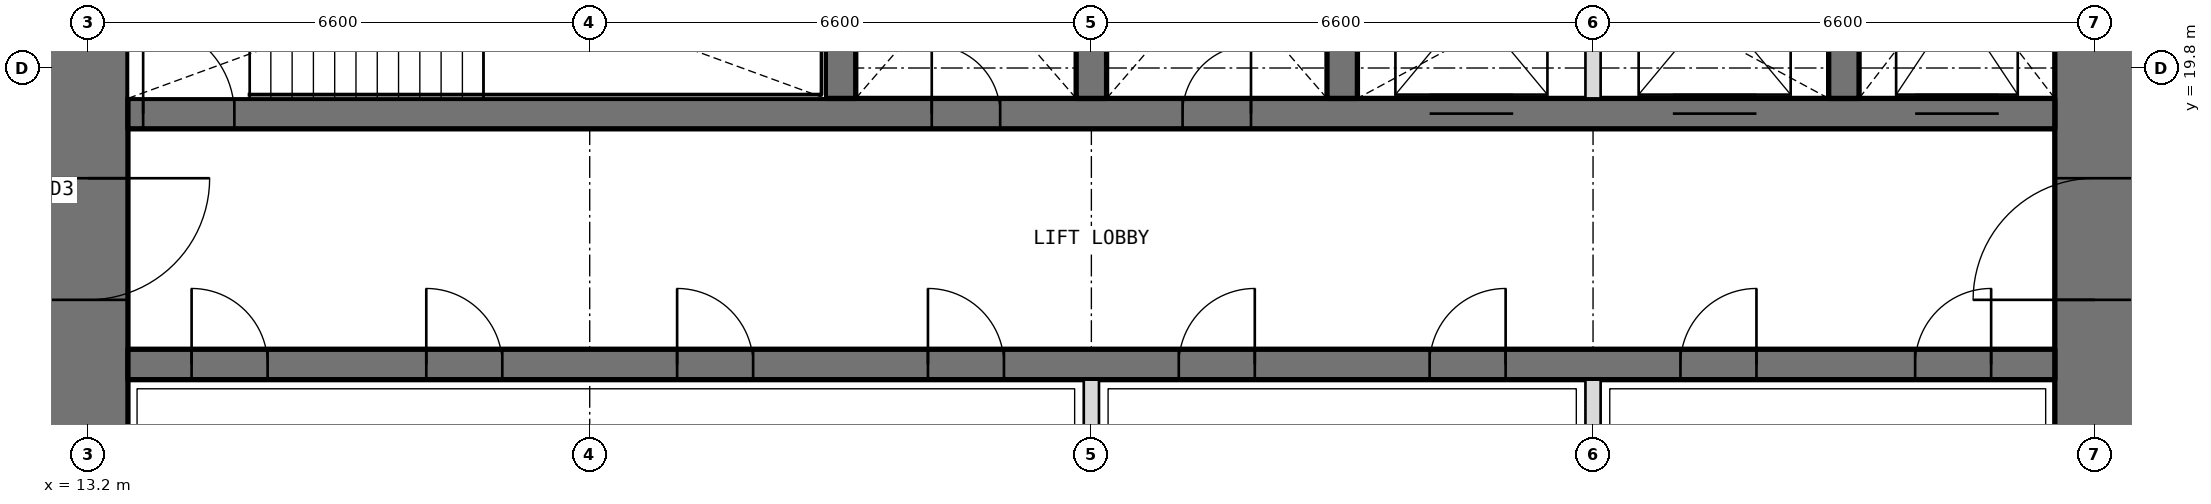
"""IFC4 building model, lengths in metres.
Left out: names, types, materials, properties, quantities, classifications, styles, units other than length and angle.
Written with IfcOpenShell. Run it as: python <this file> out.ifc"""

import sys

from ifc_helpers import new_model, si_unit, direction, frame, frame_2d, origin, place, context, subcontext, project, spatial, rectangle, extrude, element, fill, save


model = new_model("IFC4")
c1 = context("Model", 3, precision=1e-05, world=origin(), true_north=direction((0.0, 1.0)))
c2 = subcontext(c1, "Body", "Model", "MODEL_VIEW")
j1 = project(units=[si_unit("LENGTHUNIT", "METRE"), si_unit("PLANEANGLEUNIT", "RADIAN")], contexts=[c1])
p1 = place(None, origin())
s1 = spatial("IfcSite", under=j1, at=p1, CompositionType="ELEMENT")
p2 = place(p1, origin())
s2 = spatial("IfcBuilding", under=s1, at=p2, CompositionType="ELEMENT")
p3 = place(p2, frame((0.0, 0.0, 271.2)))
s3 = spatial("IfcBuildingStorey", under=s2, at=p3, CompositionType="ELEMENT", Elevation=271.2)
p4 = place(p3, frame((39.6, 13.725, 0.0), z_axis=(0.0, 0.0, 1.0), x_axis=(0.0, 1.0, 0.0)))
e1 = element("IfcWall", 1, at=p4, inside=s3, PredefinedType="SHEAR", context=c2, shape_type="SweptSolid", body=[
    extrude(rectangle(XDim=18.75, YDim=1.05, at=frame_2d((9.375, 0.0))), origin(), (0.0, 0.0, 1.0), 4.2),
])
p5 = place(p4, frame((3.025, 0.0, 0.0)))
e2 = element("IfcOpeningElement", 2, at=p5, cuts=e1, PredefinedType="OPENING", context=c2, shape_type="SweptSolid", body=[
    extrude(rectangle(XDim=1.6, YDim=2.1, at=frame_2d((0.8, 1.05))), frame((0.0, 0.535, 0.0), z_axis=(0.0, -1.0, 0.0), x_axis=(1.0, 0.0, 0.0)), (0.0, 0.0, 1.0), 1.07),
])
p6 = place(p4, frame((13.825, 0.0, 0.0)))
e3 = element("IfcOpeningElement", 3, at=p6, cuts=e1, PredefinedType="OPENING", context=c2, shape_type="SweptSolid", body=[
    extrude(rectangle(XDim=1.6, YDim=2.1, at=frame_2d((0.8, 1.05))), frame((0.0, 0.535, 0.0), z_axis=(0.0, -1.0, 0.0), x_axis=(1.0, 0.0, 0.0)), (0.0, 0.0, 1.0), 1.07),
])
p7 = place(p3, frame((13.2, 32.475, 0.0), z_axis=(0.0, 0.0, 1.0), x_axis=(0.0, -1.0, 0.0)))
e4 = element("IfcWall", 4, at=p7, inside=s3, PredefinedType="SHEAR", context=c2, shape_type="SweptSolid", body=[
    extrude(rectangle(XDim=18.75, YDim=1.05, at=frame_2d((9.375, 0.0))), origin(), (0.0, 0.0, 1.0), 4.2),
])
p8 = place(p7, frame((14.125, 0.0, 0.0)))
e5 = element("IfcOpeningElement", 5, at=p8, cuts=e4, PredefinedType="OPENING", context=c2, shape_type="SweptSolid", body=[
    extrude(rectangle(XDim=1.6, YDim=2.1, at=frame_2d((0.8, 1.05))), frame((0.0, 0.535, 0.0), z_axis=(0.0, -1.0, 0.0), x_axis=(1.0, 0.0, 0.0)), (0.0, 0.0, 1.0), 1.07),
])
p9 = place(p7, frame((3.325, 0.0, 0.0)))
e6 = element("IfcOpeningElement", 6, at=p9, cuts=e4, PredefinedType="OPENING", context=c2, shape_type="SweptSolid", body=[
    extrude(rectangle(XDim=1.6, YDim=2.1, at=frame_2d((0.8, 1.05))), frame((0.0, 0.535, 0.0), z_axis=(0.0, -1.0, 0.0), x_axis=(1.0, 0.0, 0.0)), (0.0, 0.0, 1.0), 1.07),
])
p10 = place(p3, frame((13.725, 15.9, 0.0), z_axis=(0.0, 0.0, 1.0), x_axis=(1.0, 0.0, 0.0)))
e7 = element("IfcWall", 7, at=p10, inside=s3, PredefinedType="SHEAR", context=c2, shape_type="SweptSolid", body=[
    extrude(rectangle(XDim=25.35, YDim=0.4, at=frame_2d((12.675, 0.0))), origin(), (0.0, 0.0, 1.0), 4.2),
])
p11 = place(p10, frame((0.837, 0.0, 0.0)))
e8 = element("IfcOpeningElement", 8, at=p11, cuts=e7, PredefinedType="OPENING", context=c2, shape_type="SweptSolid", body=[
    extrude(rectangle(XDim=1.0, YDim=2.1, at=frame_2d((0.5, 1.05))), frame((0.0, 0.21, 0.0), z_axis=(0.0, -1.0, 0.0), x_axis=(1.0, 0.0, 0.0)), (0.0, 0.0, 1.0), 0.42),
])
p12 = place(p10, frame((3.925, 0.0, 0.0)))
e9 = element("IfcOpeningElement", 9, at=p12, cuts=e7, PredefinedType="OPENING", context=c2, shape_type="SweptSolid", body=[
    extrude(rectangle(XDim=1.0, YDim=2.1, at=frame_2d((0.5, 1.05))), frame((0.0, 0.21, 0.0), z_axis=(0.0, -1.0, 0.0), x_axis=(1.0, 0.0, 0.0)), (0.0, 0.0, 1.0), 0.42),
])
p13 = place(p10, frame((7.225, 0.0, 0.0)))
e10 = element("IfcOpeningElement", 10, at=p13, cuts=e7, PredefinedType="OPENING", context=c2, shape_type="SweptSolid", body=[
    extrude(rectangle(XDim=1.0, YDim=2.1, at=frame_2d((0.5, 1.05))), frame((0.0, 0.21, 0.0), z_axis=(0.0, -1.0, 0.0), x_axis=(1.0, 0.0, 0.0)), (0.0, 0.0, 1.0), 0.42),
])
p14 = place(p10, frame((10.525, 0.0, 0.0)))
e11 = element("IfcOpeningElement", 11, at=p14, cuts=e7, PredefinedType="OPENING", context=c2, shape_type="SweptSolid", body=[
    extrude(rectangle(XDim=1.0, YDim=2.1, at=frame_2d((0.5, 1.05))), frame((0.0, 0.21, 0.0), z_axis=(0.0, -1.0, 0.0), x_axis=(1.0, 0.0, 0.0)), (0.0, 0.0, 1.0), 0.42),
])
p15 = place(p10, frame((13.825, 0.0, 0.0)))
e12 = element("IfcOpeningElement", 12, at=p15, cuts=e7, PredefinedType="OPENING", context=c2, shape_type="SweptSolid", body=[
    extrude(rectangle(XDim=1.0, YDim=2.1, at=frame_2d((0.5, 1.05))), frame((0.0, 0.21, 0.0), z_axis=(0.0, -1.0, 0.0), x_axis=(1.0, 0.0, 0.0)), (0.0, 0.0, 1.0), 0.42),
])
p16 = place(p10, frame((17.125, 0.0, 0.0)))
e13 = element("IfcOpeningElement", 13, at=p16, cuts=e7, PredefinedType="OPENING", context=c2, shape_type="SweptSolid", body=[
    extrude(rectangle(XDim=1.0, YDim=2.1, at=frame_2d((0.5, 1.05))), frame((0.0, 0.21, 0.0), z_axis=(0.0, -1.0, 0.0), x_axis=(1.0, 0.0, 0.0)), (0.0, 0.0, 1.0), 0.42),
])
p17 = place(p10, frame((20.425, 0.0, 0.0)))
e14 = element("IfcOpeningElement", 14, at=p17, cuts=e7, PredefinedType="OPENING", context=c2, shape_type="SweptSolid", body=[
    extrude(rectangle(XDim=1.0, YDim=2.1, at=frame_2d((0.5, 1.05))), frame((0.0, 0.21, 0.0), z_axis=(0.0, -1.0, 0.0), x_axis=(1.0, 0.0, 0.0)), (0.0, 0.0, 1.0), 0.42),
])
p18 = place(p10, frame((23.512, 0.0, 0.0)))
e15 = element("IfcOpeningElement", 15, at=p18, cuts=e7, PredefinedType="OPENING", context=c2, shape_type="SweptSolid", body=[
    extrude(rectangle(XDim=1.0, YDim=2.1, at=frame_2d((0.5, 1.05))), frame((0.0, 0.21, 0.0), z_axis=(0.0, -1.0, 0.0), x_axis=(1.0, 0.0, 0.0)), (0.0, 0.0, 1.0), 0.42),
])
p19 = place(p3, frame((13.725, 19.2, 0.0), z_axis=(0.0, 0.0, 1.0), x_axis=(1.0, 0.0, 0.0)))
e16 = element("IfcWall", 16, at=p19, inside=s3, PredefinedType="SHEAR", context=c2, shape_type="SweptSolid", body=[
    extrude(rectangle(XDim=25.35, YDim=0.4, at=frame_2d((12.675, 0.0))), origin(), (0.0, 0.0, 1.0), 4.2),
])
p20 = place(p19, frame((10.575, 0.0, 0.0)))
e17 = element("IfcOpeningElement", 17, at=p20, cuts=e16, PredefinedType="OPENING", context=c2, shape_type="SweptSolid", body=[
    extrude(rectangle(XDim=0.9, YDim=2.1, at=frame_2d((0.45, 1.05))), frame((0.0, 0.21, 0.0), z_axis=(0.0, -1.0, 0.0), x_axis=(1.0, 0.0, 0.0)), (0.0, 0.0, 1.0), 0.42),
])
p21 = place(p19, frame((13.875, 0.0, 0.0)))
e18 = element("IfcOpeningElement", 18, at=p21, cuts=e16, PredefinedType="OPENING", context=c2, shape_type="SweptSolid", body=[
    extrude(rectangle(XDim=0.9, YDim=2.1, at=frame_2d((0.45, 1.05))), frame((0.0, 0.21, 0.0), z_axis=(0.0, -1.0, 0.0), x_axis=(1.0, 0.0, 0.0)), (0.0, 0.0, 1.0), 0.42),
])
p22 = place(p19, frame((0.2, 0.0, 0.0)))
e19 = element("IfcOpeningElement", 19, at=p22, cuts=e16, PredefinedType="OPENING", context=c2, shape_type="SweptSolid", body=[
    extrude(rectangle(XDim=1.2, YDim=2.1, at=frame_2d((0.6, 1.05))), frame((0.0, 0.21, 0.0), z_axis=(0.0, -1.0, 0.0), x_axis=(1.0, 0.0, 0.0)), (0.0, 0.0, 1.0), 0.42),
])
p23 = place(p19, frame((23.512, 0.0, 0.0)))
e20 = element("IfcOpeningElement", 20, at=p23, cuts=e16, PredefinedType="OPENING", context=c2, shape_type="SweptSolid", body=[
    extrude(rectangle(XDim=1.1, YDim=2.1, at=frame_2d((0.55, 1.05))), frame((0.0, 0.21, 0.0), z_axis=(0.0, -1.0, 0.0), x_axis=(1.0, 0.0, 0.0)), (0.0, 0.0, 1.0), 0.42),
])
p24 = place(p19, frame((17.125, 0.0, 0.0)))
e21 = element("IfcOpeningElement", 21, at=p24, cuts=e16, PredefinedType="OPENING", context=c2, shape_type="SweptSolid", body=[
    extrude(rectangle(XDim=1.1, YDim=2.1, at=frame_2d((0.55, 1.05))), frame((0.0, 0.21, 0.0), z_axis=(0.0, -1.0, 0.0), x_axis=(1.0, 0.0, 0.0)), (0.0, 0.0, 1.0), 0.42),
])
p25 = place(p19, frame((20.325, 0.0, 0.0)))
e22 = element("IfcOpeningElement", 22, at=p25, cuts=e16, PredefinedType="OPENING", context=c2, shape_type="SweptSolid", body=[
    extrude(rectangle(XDim=1.1, YDim=2.1, at=frame_2d((0.55, 1.05))), frame((0.0, 0.21, 0.0), z_axis=(0.0, -1.0, 0.0), x_axis=(1.0, 0.0, 0.0)), (0.0, 0.0, 1.0), 0.42),
])
for number, where, z_axis, x_axis in (
    (23, (23.1, 19.4, 0.0), (0.0, 0.0, 1.0), (0.0, 1.0, 0.0)),
    (24, (26.4, 19.4, 0.0), (0.0, 0.0, 1.0), (0.0, 1.0, 0.0)),
    (25, (29.7, 19.4, 0.0), (0.0, 0.0, 1.0), (0.0, 1.0, 0.0)),
    (26, (36.3, 19.4, 0.0), (0.0, 0.0, 1.0), (0.0, 1.0, 0.0)),
):
    element("IfcWall", number, at=place(p3, frame(where, z_axis=z_axis, x_axis=x_axis)), inside=s3, PredefinedType="SHEAR", context=c2, shape_type="SweptSolid", body=[
        extrude(rectangle(XDim=3.35, YDim=0.4, at=frame_2d((1.675, 0.0))), origin(), (0.0, 0.0, 1.0), 4.2),
    ])
for number, where, z_axis, x_axis in (
    (27, (26.4, 13.725, 0.0), (0.0, 0.0, 1.0), (0.0, 1.0, 0.0)),
    (28, (33.0, 13.725, 0.0), (0.0, 0.0, 1.0), (0.0, 1.0, 0.0)),
):
    element("IfcWall", number, at=place(p3, frame(where, z_axis=z_axis, x_axis=x_axis)), inside=s3, PredefinedType="PARTITIONING", context=c2, shape_type="SweptSolid", body=[
        extrude(rectangle(XDim=1.975, YDim=0.2, at=frame_2d((0.987, 0.0))), origin(), (0.0, 0.0, 1.0), 4.2),
    ])
p26 = place(p3, frame((33.0, 19.4, 0.0), z_axis=(0.0, 0.0, 1.0), x_axis=(0.0, 1.0, 0.0)))
e29 = element("IfcWall", 29, at=p26, inside=s3, PredefinedType="PARTITIONING", context=c2, shape_type="SweptSolid", body=[
    extrude(rectangle(XDim=3.35, YDim=0.2, at=frame_2d((1.675, 0.0))), origin(), (0.0, 0.0, 1.0), 4.2),
])
p27 = place(p20, origin())
e30 = element("IfcDoor", 30, at=p27, inside=s3, OperationType="SINGLE_SWING_LEFT", PredefinedType="DOOR", context=c2, shape_type="SweptSolid", body=[
    extrude(rectangle(XDim=0.9, YDim=2.1, at=frame_2d((0.45, 1.05))), frame((0.0, 0.025, 0.0), z_axis=(0.0, -1.0, 0.0), x_axis=(1.0, 0.0, 0.0)), (0.0, 0.0, 1.0), 0.05),
])
fill(e17, e30)
p28 = place(p21, origin())
e31 = element("IfcDoor", 31, at=p28, inside=s3, OperationType="SINGLE_SWING_RIGHT", PredefinedType="DOOR", context=c2, shape_type="SweptSolid", body=[
    extrude(rectangle(XDim=0.9, YDim=2.1, at=frame_2d((0.45, 1.05))), frame((0.0, 0.025, 0.0), z_axis=(0.0, -1.0, 0.0), x_axis=(1.0, 0.0, 0.0)), (0.0, 0.0, 1.0), 0.05),
])
fill(e18, e31)
p29 = place(p11, origin())
e32 = element("IfcDoor", 32, at=p29, inside=s3, OperationType="SINGLE_SWING_LEFT", PredefinedType="DOOR", context=c2, shape_type="SweptSolid", body=[
    extrude(rectangle(XDim=1.0, YDim=2.1, at=frame_2d((0.5, 1.05))), frame((0.0, 0.025, 0.0), z_axis=(0.0, -1.0, 0.0), x_axis=(1.0, 0.0, 0.0)), (0.0, 0.0, 1.0), 0.05),
])
fill(e8, e32)
p30 = place(p12, origin())
e33 = element("IfcDoor", 33, at=p30, inside=s3, OperationType="SINGLE_SWING_LEFT", PredefinedType="DOOR", context=c2, shape_type="SweptSolid", body=[
    extrude(rectangle(XDim=1.0, YDim=2.1, at=frame_2d((0.5, 1.05))), frame((0.0, 0.025, 0.0), z_axis=(0.0, -1.0, 0.0), x_axis=(1.0, 0.0, 0.0)), (0.0, 0.0, 1.0), 0.05),
])
fill(e9, e33)
p31 = place(p13, origin())
e34 = element("IfcDoor", 34, at=p31, inside=s3, OperationType="SINGLE_SWING_LEFT", PredefinedType="DOOR", context=c2, shape_type="SweptSolid", body=[
    extrude(rectangle(XDim=1.0, YDim=2.1, at=frame_2d((0.5, 1.05))), frame((0.0, 0.025, 0.0), z_axis=(0.0, -1.0, 0.0), x_axis=(1.0, 0.0, 0.0)), (0.0, 0.0, 1.0), 0.05),
])
fill(e10, e34)
p32 = place(p14, origin())
e35 = element("IfcDoor", 35, at=p32, inside=s3, OperationType="SINGLE_SWING_LEFT", PredefinedType="DOOR", context=c2, shape_type="SweptSolid", body=[
    extrude(rectangle(XDim=1.0, YDim=2.1, at=frame_2d((0.5, 1.05))), frame((0.0, 0.025, 0.0), z_axis=(0.0, -1.0, 0.0), x_axis=(1.0, 0.0, 0.0)), (0.0, 0.0, 1.0), 0.05),
])
fill(e11, e35)
p33 = place(p15, origin())
e36 = element("IfcDoor", 36, at=p33, inside=s3, OperationType="SINGLE_SWING_RIGHT", PredefinedType="DOOR", context=c2, shape_type="SweptSolid", body=[
    extrude(rectangle(XDim=1.0, YDim=2.1, at=frame_2d((0.5, 1.05))), frame((0.0, 0.025, 0.0), z_axis=(0.0, -1.0, 0.0), x_axis=(1.0, 0.0, 0.0)), (0.0, 0.0, 1.0), 0.05),
])
fill(e12, e36)
p34 = place(p16, origin())
e37 = element("IfcDoor", 37, at=p34, inside=s3, OperationType="SINGLE_SWING_RIGHT", PredefinedType="DOOR", context=c2, shape_type="SweptSolid", body=[
    extrude(rectangle(XDim=1.0, YDim=2.1, at=frame_2d((0.5, 1.05))), frame((0.0, 0.025, 0.0), z_axis=(0.0, -1.0, 0.0), x_axis=(1.0, 0.0, 0.0)), (0.0, 0.0, 1.0), 0.05),
])
fill(e13, e37)
p35 = place(p17, origin())
e38 = element("IfcDoor", 38, at=p35, inside=s3, OperationType="SINGLE_SWING_RIGHT", PredefinedType="DOOR", context=c2, shape_type="SweptSolid", body=[
    extrude(rectangle(XDim=1.0, YDim=2.1, at=frame_2d((0.5, 1.05))), frame((0.0, 0.025, 0.0), z_axis=(0.0, -1.0, 0.0), x_axis=(1.0, 0.0, 0.0)), (0.0, 0.0, 1.0), 0.05),
])
fill(e14, e38)
p36 = place(p18, origin())
e39 = element("IfcDoor", 39, at=p36, inside=s3, OperationType="SINGLE_SWING_RIGHT", PredefinedType="DOOR", context=c2, shape_type="SweptSolid", body=[
    extrude(rectangle(XDim=1.0, YDim=2.1, at=frame_2d((0.5, 1.05))), frame((0.0, 0.025, 0.0), z_axis=(0.0, -1.0, 0.0), x_axis=(1.0, 0.0, 0.0)), (0.0, 0.0, 1.0), 0.05),
])
fill(e15, e39)
p37 = place(p22, origin())
e40 = element("IfcDoor", 40, at=p37, inside=s3, OperationType="SINGLE_SWING_LEFT", PredefinedType="DOOR", context=c2, shape_type="SweptSolid", body=[
    extrude(rectangle(XDim=1.2, YDim=2.1, at=frame_2d((0.6, 1.05))), frame((0.0, 0.025, 0.0), z_axis=(0.0, -1.0, 0.0), x_axis=(1.0, 0.0, 0.0)), (0.0, 0.0, 1.0), 0.05),
])
fill(e19, e40)
p38 = place(p8, origin())
e41 = element("IfcDoor", 41, at=p38, inside=s3, OperationType="DOUBLE_DOOR_DOUBLE_SWING", PredefinedType="DOOR", context=c2, shape_type="SweptSolid", body=[
    extrude(rectangle(XDim=1.6, YDim=2.1, at=frame_2d((0.8, 1.05))), frame((0.0, 0.025, 0.0), z_axis=(0.0, -1.0, 0.0), x_axis=(1.0, 0.0, 0.0)), (0.0, 0.0, 1.0), 0.05),
])
fill(e5, e41)
p39 = place(p5, origin())
e42 = element("IfcDoor", 42, at=p39, inside=s3, OperationType="DOUBLE_DOOR_DOUBLE_SWING", PredefinedType="DOOR", context=c2, shape_type="SweptSolid", body=[
    extrude(rectangle(XDim=1.6, YDim=2.1, at=frame_2d((0.8, 1.05))), frame((0.0, 0.025, 0.0), z_axis=(0.0, -1.0, 0.0), x_axis=(1.0, 0.0, 0.0)), (0.0, 0.0, 1.0), 0.05),
])
fill(e2, e42)
p40 = place(p23, origin())
e43 = element("IfcDoor", 43, at=p40, inside=s3, OperationType="DOUBLE_DOOR_SLIDING", PredefinedType="DOOR", context=c2, shape_type="SweptSolid", body=[
    extrude(rectangle(XDim=1.1, YDim=2.1, at=frame_2d((0.55, 1.05))), frame((0.0, 0.025, 0.0), z_axis=(0.0, -1.0, 0.0), x_axis=(1.0, 0.0, 0.0)), (0.0, 0.0, 1.0), 0.05),
])
fill(e20, e43)
p41 = place(p24, origin())
e44 = element("IfcDoor", 44, at=p41, inside=s3, OperationType="DOUBLE_DOOR_SLIDING", PredefinedType="DOOR", context=c2, shape_type="SweptSolid", body=[
    extrude(rectangle(XDim=1.1, YDim=2.1, at=frame_2d((0.55, 1.05))), frame((0.0, 0.025, 0.0), z_axis=(0.0, -1.0, 0.0), x_axis=(1.0, 0.0, 0.0)), (0.0, 0.0, 1.0), 0.05),
])
fill(e21, e44)
p42 = place(p25, origin())
e45 = element("IfcDoor", 45, at=p42, inside=s3, OperationType="DOUBLE_DOOR_SLIDING", PredefinedType="DOOR", context=c2, shape_type="SweptSolid", body=[
    extrude(rectangle(XDim=1.1, YDim=2.1, at=frame_2d((0.55, 1.05))), frame((0.0, 0.025, 0.0), z_axis=(0.0, -1.0, 0.0), x_axis=(1.0, 0.0, 0.0)), (0.0, 0.0, 1.0), 0.05),
])
fill(e22, e45)
save(model, sys.argv[1])
